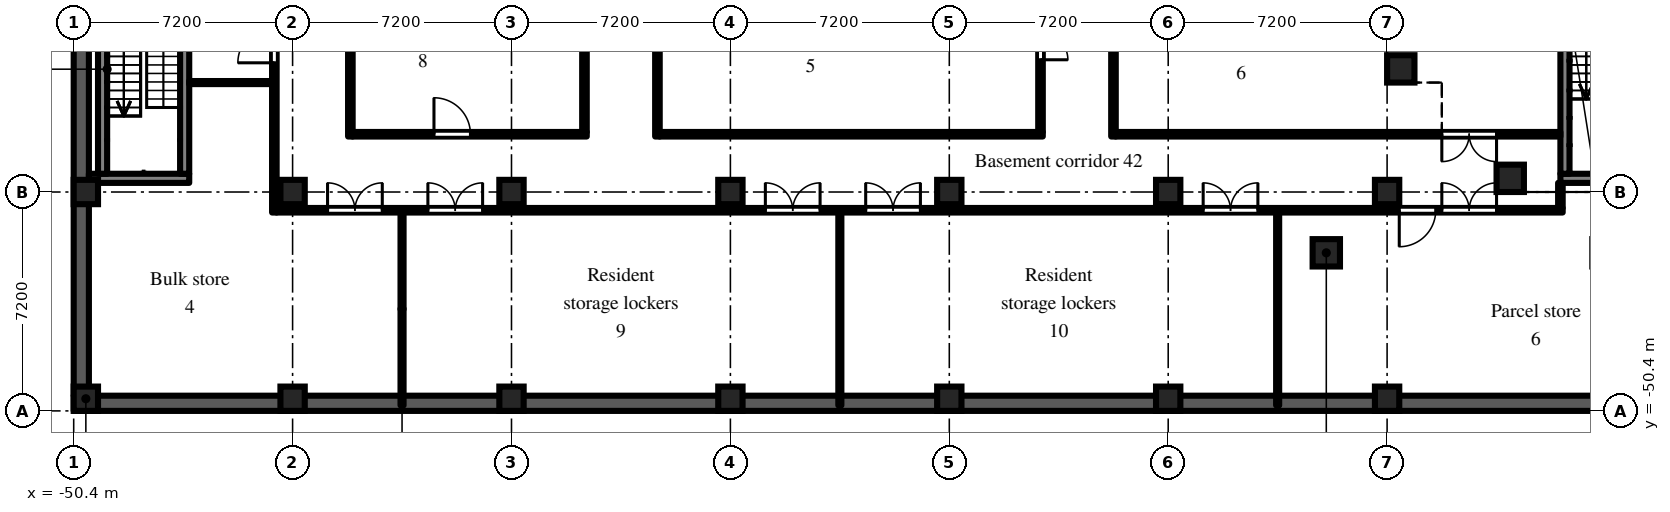
"""IFC4 building model, lengths in metres.
Left out: names, types, materials, properties, quantities, classifications, styles, units other than length and angle.
Written with IfcOpenShell. Run it as: python <this file> out.ifc"""

import sys

from ifc_helpers import new_model, si_unit, direction, frame, frame_2d, origin, origin_2d, place, context, subcontext, project, spatial, rectangle, extrude, element, fill, save


model = new_model("IFC4")
c1 = context("Model", 3, precision=1e-05, world=origin(), true_north=direction((0.0, 1.0)))
c2 = subcontext(c1, "Body", "Model", "MODEL_VIEW")
j1 = project(units=[si_unit("LENGTHUNIT", "METRE"), si_unit("PLANEANGLEUNIT", "RADIAN")], contexts=[c1])
p1 = place(None, origin())
s1 = spatial("IfcSite", under=j1, at=p1, CompositionType="ELEMENT")
p2 = place(p1, origin())
s2 = spatial("IfcBuilding", under=s1, at=p2, CompositionType="ELEMENT")
p3 = place(p2, frame((0.0, 0.0, -4.8)))
s3 = spatial("IfcBuildingStorey", under=s2, at=p3, CompositionType="ELEMENT", Elevation=-4.8)
p4 = place(p3, frame((-50.4, -50.15, -0.5), z_axis=(0.0, 0.0, 1.0), x_axis=(1.0, 0.0, 0.0)))
e1 = element("IfcWall", 1, at=p4, inside=s3, PredefinedType="SOLIDWALL", context=c2, shape_type="SweptSolid", body=[
    extrude(rectangle(XDim=100.8, YDim=0.5, at=frame_2d((50.4, 0.0))), origin(), (0.0, 0.0, 1.0), 5.3),
])
p5 = place(p3, frame((-50.15, -49.9, -0.5), z_axis=(0.0, 0.0, 1.0), x_axis=(0.0, 1.0, 0.0)))
e2 = element("IfcWall", 2, at=p5, inside=s3, PredefinedType="SOLIDWALL", context=c2, shape_type="SweptSolid", body=[
    extrude(rectangle(XDim=99.8, YDim=0.5, at=frame_2d((49.9, 0.0))), origin(), (0.0, 0.0, 1.0), 5.3),
])
for number, where, z_axis, x_axis in (
    (3, (-6.75, -39.15, -0.5), (0.0, 0.0, 1.0), (1.0, 0.0, 0.0)),
    (4, (-3.15, -42.75, -0.5), (0.0, 0.0, 1.0), (1.0, 0.0, 0.0)),
):
    element("IfcColumn", number, at=place(p3, frame(where, z_axis=z_axis, x_axis=x_axis)), inside=s3, PredefinedType="COLUMN", context=c2, shape_type="SweptSolid", body=[
        extrude(rectangle(XDim=0.9, YDim=0.9, at=origin_2d()), origin(), (0.0, 0.0, 1.0), 5.3),
    ])
for number, where, z_axis, x_axis in (
    (5, (-50.0, -50.0, -0.5), (0.0, 0.0, 1.0), (1.0, 0.0, 0.0)),
    (6, (-50.0, -43.2, -0.5), (0.0, 0.0, 1.0), (1.0, 0.0, 0.0)),
    (7, (-43.2, -50.0, -0.5), (0.0, 0.0, 1.0), (1.0, 0.0, 0.0)),
    (8, (-43.2, -43.2, -0.5), (0.0, 0.0, 1.0), (1.0, 0.0, 0.0)),
    (9, (-36.0, -50.0, -0.5), (0.0, 0.0, 1.0), (1.0, 0.0, 0.0)),
    (10, (-36.0, -43.2, -0.5), (0.0, 0.0, 1.0), (1.0, 0.0, 0.0)),
    (11, (-28.8, -50.0, -0.5), (0.0, 0.0, 1.0), (1.0, 0.0, 0.0)),
    (12, (-28.8, -43.2, -0.5), (0.0, 0.0, 1.0), (1.0, 0.0, 0.0)),
    (13, (-21.6, -50.0, -0.5), (0.0, 0.0, 1.0), (1.0, 0.0, 0.0)),
    (14, (-21.6, -43.2, -0.5), (0.0, 0.0, 1.0), (1.0, 0.0, 0.0)),
    (15, (-14.4, -50.0, -0.5), (0.0, 0.0, 1.0), (1.0, 0.0, 0.0)),
    (16, (-14.4, -43.2, -0.5), (0.0, 0.0, 1.0), (1.0, 0.0, 0.0)),
    (17, (-7.2, -50.0, -0.5), (0.0, 0.0, 1.0), (1.0, 0.0, 0.0)),
    (18, (-7.2, -43.2, -0.5), (0.0, 0.0, 1.0), (1.0, 0.0, 0.0)),
):
    element("IfcColumn", number, at=place(p3, frame(where, z_axis=z_axis, x_axis=x_axis)), inside=s3, PredefinedType="COLUMN", context=c2, shape_type="SweptSolid", body=[
        extrude(rectangle(XDim=0.8, YDim=0.8, at=origin_2d()), origin(), (0.0, 0.0, 1.0), 5.3),
    ])
p6 = place(p3, frame((-9.2, -45.2, -0.5), z_axis=(0.0, 0.0, 1.0), x_axis=(1.0, 0.0, 0.0)))
e19 = element("IfcColumn", 19, at=p6, inside=s3, PredefinedType="COLUMN", context=c2, shape_type="SweptSolid", body=[
    extrude(rectangle(XDim=0.9, YDim=0.9, at=origin_2d()), origin(), (0.0, 0.0, 1.0), 5.3),
])
p7 = place(p3, frame((-1.5, -42.75, 0.0), z_axis=(0.0, 0.0, 1.0), x_axis=(1.0, 0.0, 0.0)))
e20 = element("IfcWall", 20, at=p7, inside=s3, PredefinedType="SHEAR", context=c2, shape_type="SweptSolid", body=[
    extrude(rectangle(XDim=3.0, YDim=0.3, at=frame_2d((1.5, 0.0))), origin(), (0.0, 0.0, 1.0), 4.35),
])
p8 = place(p3, frame((-1.35, -36.8, 0.0), z_axis=(0.0, 0.0, 1.0), x_axis=(0.0, -1.0, 0.0)))
e21 = element("IfcWall", 21, at=p8, inside=s3, PredefinedType="SHEAR", context=c2, shape_type="SweptSolid", body=[
    extrude(rectangle(XDim=5.8, YDim=0.3, at=frame_2d((2.9, 0.0))), origin(), (0.0, 0.0, 1.0), 4.35),
])
p9 = place(p3, frame((-49.9, -42.75, 0.0), z_axis=(0.0, 0.0, 1.0), x_axis=(1.0, 0.0, 0.0)))
e22 = element("IfcWall", 22, at=p9, inside=s3, PredefinedType="SHEAR", context=c2, shape_type="SweptSolid", body=[
    extrude(rectangle(XDim=3.3, YDim=0.3, at=frame_2d((1.65, 0.0))), origin(), (0.0, 0.0, 1.0), 4.35),
])
for number, where, z_axis, x_axis in (
    (23, (-49.45, -36.8, 0.0), (0.0, 0.0, 1.0), (0.0, -1.0, 0.0)),
    (24, (-46.75, -36.8, 0.0), (0.0, 0.0, 1.0), (0.0, -1.0, 0.0)),
):
    element("IfcWall", number, at=place(p3, frame(where, z_axis=z_axis, x_axis=x_axis)), inside=s3, PredefinedType="SHEAR", context=c2, shape_type="SweptSolid", body=[
        extrude(rectangle(XDim=5.8, YDim=0.3, at=frame_2d((2.9, 0.0))), origin(), (0.0, 0.0, 1.0), 4.35),
    ])
p10 = place(p3, frame((-46.6, -39.6, 0.0), z_axis=(0.0, 0.0, 1.0), x_axis=(1.0, 0.0, 0.0)))
e25 = element("IfcWall", 25, at=p10, inside=s3, PredefinedType="PARTITIONING", context=c2, shape_type="SweptSolid", body=[
    extrude(rectangle(XDim=2.725, YDim=0.1, at=frame_2d((1.363, 0.0))), origin(), (0.0, 0.0, 1.0), 4.35),
])
p11 = place(p3, frame((-43.8, -43.875, 0.0), z_axis=(0.0, 0.0, 1.0), x_axis=(0.0, 1.0, 0.0)))
e26 = element("IfcWall", 26, at=p11, inside=s3, PredefinedType="PARTITIONING", context=c2, shape_type="SweptSolid", body=[
    extrude(rectangle(XDim=10.2, YDim=0.15, at=frame_2d((5.1, 0.0))), origin(), (0.0, 0.0, 1.0), 4.35),
])
p12 = place(p11, frame((4.925, 0.0, 0.0)))
e27 = element("IfcOpeningElement", 27, at=p12, cuts=e26, PredefinedType="OPENING", context=c2, shape_type="SweptSolid", body=[
    extrude(rectangle(XDim=1.2, YDim=2.1, at=frame_2d((0.6, 1.05))), frame((0.0, 0.085, 0.0), z_axis=(0.0, -1.0, 0.0), x_axis=(1.0, 0.0, 0.0)), (0.0, 0.0, 1.0), 0.17),
])
p13 = place(p3, frame((-43.725, -43.8, 0.0), z_axis=(0.0, 0.0, 1.0), x_axis=(1.0, 0.0, 0.0)))
e28 = element("IfcWall", 28, at=p13, inside=s3, PredefinedType="PARTITIONING", context=c2, shape_type="SweptSolid", body=[
    extrude(rectangle(XDim=42.3, YDim=0.15, at=frame_2d((21.15, 0.0))), origin(), (0.0, 0.0, 1.0), 4.35),
])
p14 = place(p13, frame((1.675, 0.0, 0.0)))
e29 = element("IfcOpeningElement", 29, at=p14, cuts=e28, PredefinedType="OPENING", context=c2, shape_type="SweptSolid", body=[
    extrude(rectangle(XDim=1.8, YDim=2.1, at=frame_2d((0.9, 1.05))), frame((0.0, 0.085, 0.0), z_axis=(0.0, -1.0, 0.0), x_axis=(1.0, 0.0, 0.0)), (0.0, 0.0, 1.0), 0.17),
])
p15 = place(p13, frame((4.975, 0.0, 0.0)))
e30 = element("IfcOpeningElement", 30, at=p15, cuts=e28, PredefinedType="OPENING", context=c2, shape_type="SweptSolid", body=[
    extrude(rectangle(XDim=1.8, YDim=2.1, at=frame_2d((0.9, 1.05))), frame((0.0, 0.085, 0.0), z_axis=(0.0, -1.0, 0.0), x_axis=(1.0, 0.0, 0.0)), (0.0, 0.0, 1.0), 0.17),
])
p16 = place(p13, frame((16.075, 0.0, 0.0)))
e31 = element("IfcOpeningElement", 31, at=p16, cuts=e28, PredefinedType="OPENING", context=c2, shape_type="SweptSolid", body=[
    extrude(rectangle(XDim=1.8, YDim=2.1, at=frame_2d((0.9, 1.05))), frame((0.0, 0.085, 0.0), z_axis=(0.0, -1.0, 0.0), x_axis=(1.0, 0.0, 0.0)), (0.0, 0.0, 1.0), 0.17),
])
p17 = place(p13, frame((19.375, 0.0, 0.0)))
e32 = element("IfcOpeningElement", 32, at=p17, cuts=e28, PredefinedType="OPENING", context=c2, shape_type="SweptSolid", body=[
    extrude(rectangle(XDim=1.8, YDim=2.1, at=frame_2d((0.9, 1.05))), frame((0.0, 0.085, 0.0), z_axis=(0.0, -1.0, 0.0), x_axis=(1.0, 0.0, 0.0)), (0.0, 0.0, 1.0), 0.17),
])
p18 = place(p13, frame((30.475, 0.0, 0.0)))
e33 = element("IfcOpeningElement", 33, at=p18, cuts=e28, PredefinedType="OPENING", context=c2, shape_type="SweptSolid", body=[
    extrude(rectangle(XDim=1.8, YDim=2.1, at=frame_2d((0.9, 1.05))), frame((0.0, 0.085, 0.0), z_axis=(0.0, -1.0, 0.0), x_axis=(1.0, 0.0, 0.0)), (0.0, 0.0, 1.0), 0.17),
])
p19 = place(p13, frame((36.925, 0.0, 0.0)))
e34 = element("IfcOpeningElement", 34, at=p19, cuts=e28, PredefinedType="OPENING", context=c2, shape_type="SweptSolid", body=[
    extrude(rectangle(XDim=1.2, YDim=2.1, at=frame_2d((0.6, 1.05))), frame((0.0, 0.085, 0.0), z_axis=(0.0, -1.0, 0.0), x_axis=(1.0, 0.0, 0.0)), (0.0, 0.0, 1.0), 0.17),
])
p20 = place(p13, frame((38.325, 0.0, 0.0)))
e35 = element("IfcOpeningElement", 35, at=p20, cuts=e28, PredefinedType="OPENING", context=c2, shape_type="SweptSolid", body=[
    extrude(rectangle(XDim=1.8, YDim=2.1, at=frame_2d((0.9, 1.05))), frame((0.0, 0.085, 0.0), z_axis=(0.0, -1.0, 0.0), x_axis=(1.0, 0.0, 0.0)), (0.0, 0.0, 1.0), 0.17),
])
p21 = place(p3, frame((-41.3, -41.375, 0.0), z_axis=(0.0, 0.0, 1.0), x_axis=(0.0, 1.0, 0.0)))
e36 = element("IfcWall", 36, at=p21, inside=s3, PredefinedType="PARTITIONING", context=c2, shape_type="SweptSolid", body=[
    extrude(rectangle(XDim=7.85, YDim=0.15, at=frame_2d((3.925, 0.0))), origin(), (0.0, 0.0, 1.0), 4.35),
])
p22 = place(p3, frame((-41.225, -41.3, 0.0), z_axis=(0.0, 0.0, 1.0), x_axis=(1.0, 0.0, 0.0)))
e37 = element("IfcWall", 37, at=p22, inside=s3, PredefinedType="PARTITIONING", context=c2, shape_type="SweptSolid", body=[
    extrude(rectangle(XDim=7.7, YDim=0.15, at=frame_2d((3.85, 0.0))), origin(), (0.0, 0.0, 1.0), 4.35),
])
p23 = place(p22, frame((2.675, 0.0, 0.0)))
e38 = element("IfcOpeningElement", 38, at=p23, cuts=e37, PredefinedType="OPENING", context=c2, shape_type="SweptSolid", body=[
    extrude(rectangle(XDim=1.2, YDim=2.1, at=frame_2d((0.6, 1.05))), frame((0.0, 0.085, 0.0), z_axis=(0.0, -1.0, 0.0), x_axis=(1.0, 0.0, 0.0)), (0.0, 0.0, 1.0), 0.17),
])
p24 = place(p3, frame((-39.6, -50.22, 0.0), z_axis=(0.0, 0.0, 1.0), x_axis=(0.0, 1.0, 0.0)))
e39 = element("IfcWall", 39, at=p24, inside=s3, PredefinedType="PARTITIONING", context=c2, shape_type="SweptSolid", body=[
    extrude(rectangle(XDim=6.345, YDim=0.1, at=frame_2d((3.172, 0.0))), origin(), (0.0, 0.0, 1.0), 4.35),
])
p25 = place(p3, frame((-33.6, -41.225, 0.0), z_axis=(0.0, 0.0, 1.0), x_axis=(0.0, 1.0, 0.0)))
e40 = element("IfcWall", 40, at=p25, inside=s3, PredefinedType="PARTITIONING", context=c2, shape_type="SweptSolid", body=[
    extrude(rectangle(XDim=7.55, YDim=0.15, at=frame_2d((3.775, 0.0))), origin(), (0.0, 0.0, 1.0), 4.35),
])
p26 = place(p3, frame((-31.2, -41.375, 0.0), z_axis=(0.0, 0.0, 1.0), x_axis=(0.0, 1.0, 0.0)))
e41 = element("IfcWall", 41, at=p26, inside=s3, PredefinedType="PARTITIONING", context=c2, shape_type="SweptSolid", body=[
    extrude(rectangle(XDim=7.85, YDim=0.15, at=frame_2d((3.925, 0.0))), origin(), (0.0, 0.0, 1.0), 4.35),
])
p27 = place(p26, frame((3.525, 0.0, 0.0)))
e42 = element("IfcOpeningElement", 42, at=p27, cuts=e41, PredefinedType="OPENING", context=c2, shape_type="SweptSolid", body=[
    extrude(rectangle(XDim=1.8, YDim=2.1, at=frame_2d((0.9, 1.05))), frame((0.0, 0.085, 0.0), z_axis=(0.0, -1.0, 0.0), x_axis=(1.0, 0.0, 0.0)), (0.0, 0.0, 1.0), 0.17),
])
p28 = place(p3, frame((-31.125, -41.3, 0.0), z_axis=(0.0, 0.0, 1.0), x_axis=(1.0, 0.0, 0.0)))
e43 = element("IfcWall", 43, at=p28, inside=s3, PredefinedType="PARTITIONING", context=c2, shape_type="SweptSolid", body=[
    extrude(rectangle(XDim=12.6, YDim=0.15, at=frame_2d((6.3, 0.0))), origin(), (0.0, 0.0, 1.0), 4.35),
])
p29 = place(p3, frame((-25.2, -50.22, 0.0), z_axis=(0.0, 0.0, 1.0), x_axis=(0.0, 1.0, 0.0)))
e44 = element("IfcWall", 44, at=p29, inside=s3, PredefinedType="PARTITIONING", context=c2, shape_type="SweptSolid", body=[
    extrude(rectangle(XDim=6.345, YDim=0.1, at=frame_2d((3.172, 0.0))), origin(), (0.0, 0.0, 1.0), 4.35),
])
p30 = place(p3, frame((-18.6, -41.225, 0.0), z_axis=(0.0, 0.0, 1.0), x_axis=(0.0, 1.0, 0.0)))
e45 = element("IfcWall", 45, at=p30, inside=s3, PredefinedType="PARTITIONING", context=c2, shape_type="SweptSolid", body=[
    extrude(rectangle(XDim=7.55, YDim=0.15, at=frame_2d((3.775, 0.0))), origin(), (0.0, 0.0, 1.0), 4.35),
])
p31 = place(p30, frame((2.375, 0.0, 0.0)))
e46 = element("IfcOpeningElement", 46, at=p31, cuts=e45, PredefinedType="OPENING", context=c2, shape_type="SweptSolid", body=[
    extrude(rectangle(XDim=1.8, YDim=2.1, at=frame_2d((0.9, 1.05))), frame((0.0, 0.085, 0.0), z_axis=(0.0, -1.0, 0.0), x_axis=(1.0, 0.0, 0.0)), (0.0, 0.0, 1.0), 0.17),
])
p32 = place(p3, frame((-16.2, -41.375, 0.0), z_axis=(0.0, 0.0, 1.0), x_axis=(0.0, 1.0, 0.0)))
e47 = element("IfcWall", 47, at=p32, inside=s3, PredefinedType="PARTITIONING", context=c2, shape_type="SweptSolid", body=[
    extrude(rectangle(XDim=7.85, YDim=0.15, at=frame_2d((3.925, 0.0))), origin(), (0.0, 0.0, 1.0), 4.35),
])
p33 = place(p32, frame((3.525, 0.0, 0.0)))
e48 = element("IfcOpeningElement", 48, at=p33, cuts=e47, PredefinedType="OPENING", context=c2, shape_type="SweptSolid", body=[
    extrude(rectangle(XDim=1.8, YDim=2.1, at=frame_2d((0.9, 1.05))), frame((0.0, 0.085, 0.0), z_axis=(0.0, -1.0, 0.0), x_axis=(1.0, 0.0, 0.0)), (0.0, 0.0, 1.0), 0.17),
])
p34 = place(p3, frame((-16.125, -41.3, 0.0), z_axis=(0.0, 0.0, 1.0), x_axis=(1.0, 0.0, 0.0)))
e49 = element("IfcWall", 49, at=p34, inside=s3, PredefinedType="PARTITIONING", context=c2, shape_type="SweptSolid", body=[
    extrude(rectangle(XDim=14.625, YDim=0.15, at=frame_2d((7.312, 0.0))), origin(), (0.0, 0.0, 1.0), 4.35),
])
p35 = place(p34, frame((10.725, 0.0, 0.0)))
e50 = element("IfcOpeningElement", 50, at=p35, cuts=e49, PredefinedType="OPENING", context=c2, shape_type="SweptSolid", body=[
    extrude(rectangle(XDim=1.8, YDim=2.1, at=frame_2d((0.9, 1.05))), frame((0.0, 0.085, 0.0), z_axis=(0.0, -1.0, 0.0), x_axis=(1.0, 0.0, 0.0)), (0.0, 0.0, 1.0), 0.17),
])
p36 = place(p3, frame((-10.8, -50.22, 0.0), z_axis=(0.0, 0.0, 1.0), x_axis=(0.0, 1.0, 0.0)))
e51 = element("IfcWall", 51, at=p36, inside=s3, PredefinedType="PARTITIONING", context=c2, shape_type="SweptSolid", body=[
    extrude(rectangle(XDim=6.345, YDim=0.1, at=frame_2d((3.172, 0.0))), origin(), (0.0, 0.0, 1.0), 4.35),
])
p37 = place(p3, frame((-1.5, -43.725, 0.0), z_axis=(0.0, 0.0, 1.0), x_axis=(0.0, 1.0, 0.0)))
e52 = element("IfcWall", 52, at=p37, inside=s3, PredefinedType="PARTITIONING", context=c2, shape_type="SweptSolid", body=[
    extrude(rectangle(XDim=0.825, YDim=0.15, at=frame_2d((0.413, 0.0))), origin(), (0.0, 0.0, 1.0), 4.35),
])
p38 = place(p12, origin())
e53 = element("IfcDoor", 53, at=p38, inside=s3, OperationType="SINGLE_SWING_LEFT", PredefinedType="DOOR", context=c2, shape_type="SweptSolid", body=[
    extrude(rectangle(XDim=1.2, YDim=2.1, at=frame_2d((0.6, 1.05))), frame((0.0, 0.025, 0.0), z_axis=(0.0, -1.0, 0.0), x_axis=(1.0, 0.0, 0.0)), (0.0, 0.0, 1.0), 0.05),
])
fill(e27, e53)
p39 = place(p23, origin())
e54 = element("IfcDoor", 54, at=p39, inside=s3, OperationType="SINGLE_SWING_LEFT", PredefinedType="DOOR", context=c2, shape_type="SweptSolid", body=[
    extrude(rectangle(XDim=1.2, YDim=2.1, at=frame_2d((0.6, 1.05))), frame((0.0, 0.025, 0.0), z_axis=(0.0, -1.0, 0.0), x_axis=(1.0, 0.0, 0.0)), (0.0, 0.0, 1.0), 0.05),
])
fill(e38, e54)
p40 = place(p31, frame((1.8, 0.0, 0.0), z_axis=(0.0, 0.0, 1.0), x_axis=(-1.0, 0.0, 0.0)))
e55 = element("IfcDoor", 55, at=p40, inside=s3, OperationType="DOUBLE_DOOR_DOUBLE_SWING", PredefinedType="DOOR", context=c2, shape_type="SweptSolid", body=[
    extrude(rectangle(XDim=1.8, YDim=2.1, at=frame_2d((0.9, 1.05))), frame((0.0, 0.025, 0.0), z_axis=(0.0, -1.0, 0.0), x_axis=(1.0, 0.0, 0.0)), (0.0, 0.0, 1.0), 0.05),
])
fill(e46, e55)
p41 = place(p35, frame((1.8, 0.0, 0.0), z_axis=(0.0, 0.0, 1.0), x_axis=(-1.0, 0.0, 0.0)))
e56 = element("IfcDoor", 56, at=p41, inside=s3, OperationType="DOUBLE_DOOR_DOUBLE_SWING", PredefinedType="DOOR", context=c2, shape_type="SweptSolid", body=[
    extrude(rectangle(XDim=1.8, YDim=2.1, at=frame_2d((0.9, 1.05))), frame((0.0, 0.025, 0.0), z_axis=(0.0, -1.0, 0.0), x_axis=(1.0, 0.0, 0.0)), (0.0, 0.0, 1.0), 0.05),
])
fill(e50, e56)
p42 = place(p14, origin())
e57 = element("IfcDoor", 57, at=p42, inside=s3, OperationType="DOUBLE_DOOR_DOUBLE_SWING", PredefinedType="DOOR", context=c2, shape_type="SweptSolid", body=[
    extrude(rectangle(XDim=1.8, YDim=2.1, at=frame_2d((0.9, 1.05))), frame((0.0, 0.025, 0.0), z_axis=(0.0, -1.0, 0.0), x_axis=(1.0, 0.0, 0.0)), (0.0, 0.0, 1.0), 0.05),
])
fill(e29, e57)
p43 = place(p15, origin())
e58 = element("IfcDoor", 58, at=p43, inside=s3, OperationType="DOUBLE_DOOR_DOUBLE_SWING", PredefinedType="DOOR", context=c2, shape_type="SweptSolid", body=[
    extrude(rectangle(XDim=1.8, YDim=2.1, at=frame_2d((0.9, 1.05))), frame((0.0, 0.025, 0.0), z_axis=(0.0, -1.0, 0.0), x_axis=(1.0, 0.0, 0.0)), (0.0, 0.0, 1.0), 0.05),
])
fill(e30, e58)
p44 = place(p16, origin())
e59 = element("IfcDoor", 59, at=p44, inside=s3, OperationType="DOUBLE_DOOR_DOUBLE_SWING", PredefinedType="DOOR", context=c2, shape_type="SweptSolid", body=[
    extrude(rectangle(XDim=1.8, YDim=2.1, at=frame_2d((0.9, 1.05))), frame((0.0, 0.025, 0.0), z_axis=(0.0, -1.0, 0.0), x_axis=(1.0, 0.0, 0.0)), (0.0, 0.0, 1.0), 0.05),
])
fill(e31, e59)
p45 = place(p17, origin())
e60 = element("IfcDoor", 60, at=p45, inside=s3, OperationType="DOUBLE_DOOR_DOUBLE_SWING", PredefinedType="DOOR", context=c2, shape_type="SweptSolid", body=[
    extrude(rectangle(XDim=1.8, YDim=2.1, at=frame_2d((0.9, 1.05))), frame((0.0, 0.025, 0.0), z_axis=(0.0, -1.0, 0.0), x_axis=(1.0, 0.0, 0.0)), (0.0, 0.0, 1.0), 0.05),
])
fill(e32, e60)
p46 = place(p18, origin())
e61 = element("IfcDoor", 61, at=p46, inside=s3, OperationType="DOUBLE_DOOR_DOUBLE_SWING", PredefinedType="DOOR", context=c2, shape_type="SweptSolid", body=[
    extrude(rectangle(XDim=1.8, YDim=2.1, at=frame_2d((0.9, 1.05))), frame((0.0, 0.025, 0.0), z_axis=(0.0, -1.0, 0.0), x_axis=(1.0, 0.0, 0.0)), (0.0, 0.0, 1.0), 0.05),
])
fill(e33, e61)
p47 = place(p19, frame((1.2, 0.0, 0.0), z_axis=(0.0, 0.0, 1.0), x_axis=(-1.0, 0.0, 0.0)))
e62 = element("IfcDoor", 62, at=p47, inside=s3, OperationType="SINGLE_SWING_RIGHT", PredefinedType="DOOR", context=c2, shape_type="SweptSolid", body=[
    extrude(rectangle(XDim=1.2, YDim=2.1, at=frame_2d((0.6, 1.05))), frame((0.0, 0.025, 0.0), z_axis=(0.0, -1.0, 0.0), x_axis=(1.0, 0.0, 0.0)), (0.0, 0.0, 1.0), 0.05),
])
fill(e34, e62)
p48 = place(p20, origin())
e63 = element("IfcDoor", 63, at=p48, inside=s3, OperationType="DOUBLE_DOOR_DOUBLE_SWING", PredefinedType="DOOR", context=c2, shape_type="SweptSolid", body=[
    extrude(rectangle(XDim=1.8, YDim=2.1, at=frame_2d((0.9, 1.05))), frame((0.0, 0.025, 0.0), z_axis=(0.0, -1.0, 0.0), x_axis=(1.0, 0.0, 0.0)), (0.0, 0.0, 1.0), 0.05),
])
fill(e35, e63)
save(model, sys.argv[1])
